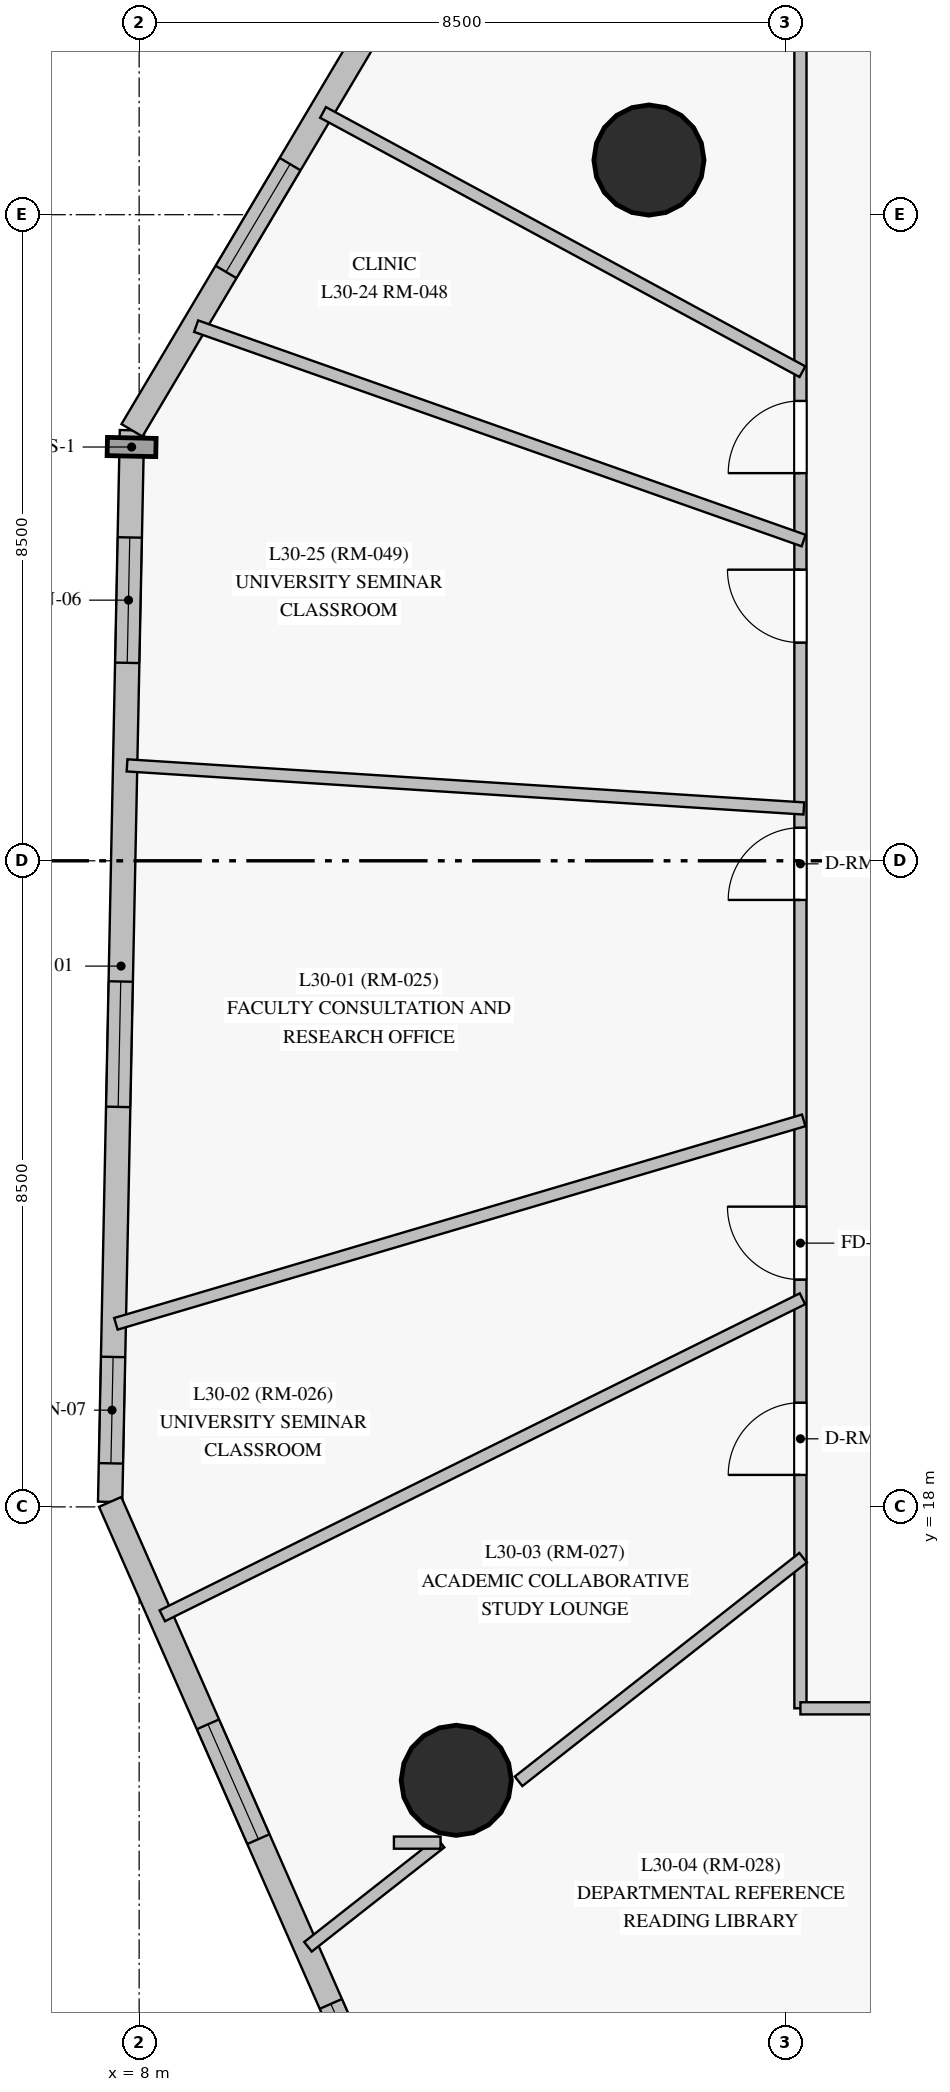
"""IFC4 building model, lengths in metres.
Left out: names, types, materials, properties, quantities, classifications, styles, units other than length and angle.
Written with IfcOpenShell. Run it as: python <this file> out.ifc"""

import sys

from ifc_helpers import new_model, si_unit, direction, frame, frame_2d, origin, origin_with_axes, origin_2d, place, context, subcontext, project, spatial, rectangle, circle, extrude, source, transform, mapped, element, fill, save


model = new_model("IFC4")
c1 = context("Model", 3, precision=1e-05, world=origin(), true_north=direction((0.0, 1.0)))
c2 = subcontext(c1, "Body", "Model", "MODEL_VIEW")
j1 = project(units=[si_unit("LENGTHUNIT", "METRE"), si_unit("PLANEANGLEUNIT", "RADIAN")], contexts=[c1])
p1 = place(None, origin())
s1 = spatial("IfcSite", under=j1, at=p1, CompositionType="ELEMENT")
p2 = place(p1, origin())
s2 = spatial("IfcBuilding", under=s1, at=p2, CompositionType="ELEMENT")
p3 = place(p2, frame((0.0, 0.0, 111.45)))
s3 = spatial("IfcBuildingStorey", under=s2, at=p3, CompositionType="ELEMENT", Elevation=111.45)
m1 = source(origin_with_axes(), c2, "Body", "SweptSolid", [
    extrude(circle(Radius=0.725, at=origin_2d()), origin(), (0.0, 0.0, 1.0), 3.05),
])
for number, where, z_axis, x_axis in (
    (1, (14.707, 35.719, 0.0), (0.0, 0.0, 1.0), (1.0, 0.0, 0.0)),
    (2, (12.172, 14.403, 0.0), (0.0, 0.0, 1.0), (1.0, 0.0, 0.0)),
):
    element("IfcColumn", number, at=place(p3, frame(where, z_axis=z_axis, x_axis=x_axis)), inside=s3, PredefinedType="COLUMN", context=c2, shape_type="MappedRepresentation", body=[
        mapped(m1, transform((0.0, 0.0, 0.0), scale=1.0)),
    ])
p4 = place(p3, frame((7.906, 32.164, 0.0), z_axis=(0.0, 0.0, 1.0), x_axis=(-0.020343518734, -0.999793049208, 0.0)))
e3 = element("IfcWall", 3, at=p4, inside=s3, PredefinedType="SOLIDWALL", context=c2, shape_type="SweptSolid", body=[
    extrude(rectangle(XDim=14.101, YDim=0.32, at=frame_2d((7.051, 0.0))), origin(), (0.0, 0.0, 1.0), 2.825),
])
p5 = place(p4, frame((1.41, 0.0, 0.85)))
e4 = element("IfcOpeningElement", 4, at=p5, cuts=e3, PredefinedType="OPENING", context=c2, shape_type="SweptSolid", body=[
    extrude(rectangle(XDim=1.65, YDim=1.65, at=frame_2d((0.825, 0.825))), frame((0.0, 0.17, 0.0), z_axis=(0.0, -1.0, 0.0), x_axis=(1.0, 0.0, 0.0)), (0.0, 0.0, 1.0), 0.34),
])
p6 = place(p4, frame((7.253, 0.0, 0.85)))
e5 = element("IfcOpeningElement", 5, at=p6, cuts=e3, PredefinedType="OPENING", context=c2, shape_type="SweptSolid", body=[
    extrude(rectangle(XDim=1.65, YDim=1.65, at=frame_2d((0.825, 0.825))), frame((0.0, 0.17, 0.0), z_axis=(0.0, -1.0, 0.0), x_axis=(1.0, 0.0, 0.0)), (0.0, 0.0, 1.0), 0.34),
])
p7 = place(p4, frame((12.194, 0.0, 0.85)))
e6 = element("IfcOpeningElement", 6, at=p7, cuts=e3, PredefinedType="OPENING", context=c2, shape_type="SweptSolid", body=[
    extrude(rectangle(XDim=1.4, YDim=1.65, at=frame_2d((0.7, 0.825))), frame((0.0, 0.17, 0.0), z_axis=(0.0, -1.0, 0.0), x_axis=(1.0, 0.0, 0.0)), (0.0, 0.0, 1.0), 0.34),
])
p8 = place(p3, frame((7.619, 18.066, 0.0), z_axis=(0.0, 0.0, 1.0), x_axis=(0.402458923795, -0.915438045232, 0.0)))
e7 = element("IfcWall", 7, at=p8, inside=s3, PredefinedType="SOLIDWALL", context=c2, shape_type="SweptSolid", body=[
    extrude(rectangle(XDim=9.742, YDim=0.32, at=frame_2d((4.871, 0.0))), origin(), (0.0, 0.0, 1.0), 2.825),
])
p9 = place(p8, frame((3.197, 0.0, 0.85)))
e8 = element("IfcOpeningElement", 8, at=p9, cuts=e7, PredefinedType="OPENING", context=c2, shape_type="SweptSolid", body=[
    extrude(rectangle(XDim=1.65, YDim=1.65, at=frame_2d((0.825, 0.825))), frame((0.0, 0.17, 0.0), z_axis=(0.0, -1.0, 0.0), x_axis=(1.0, 0.0, 0.0)), (0.0, 0.0, 1.0), 0.34),
])
p10 = place(p8, frame((7.214, 0.0, 0.85)))
e9 = element("IfcOpeningElement", 9, at=p10, cuts=e7, PredefinedType="OPENING", context=c2, shape_type="SweptSolid", body=[
    extrude(rectangle(XDim=1.65, YDim=1.65, at=frame_2d((0.825, 0.825))), frame((0.0, 0.17, 0.0), z_axis=(0.0, -1.0, 0.0), x_axis=(1.0, 0.0, 0.0)), (0.0, 0.0, 1.0), 0.34),
])
p11 = place(p3, frame((13.68, 41.881, 0.0), z_axis=(0.0, 0.0, 1.0), x_axis=(-0.510835150925, -0.859678689151, 0.0)))
e10 = element("IfcWall", 10, at=p11, inside=s3, PredefinedType="SOLIDWALL", context=c2, shape_type="SweptSolid", body=[
    extrude(rectangle(XDim=11.303, YDim=0.32, at=frame_2d((5.652, 0.0))), origin(), (0.0, 0.0, 1.0), 2.825),
])
p12 = place(p11, frame((2.417, 0.0, 0.85)))
e11 = element("IfcOpeningElement", 11, at=p12, cuts=e10, PredefinedType="OPENING", context=c2, shape_type="SweptSolid", body=[
    extrude(rectangle(XDim=1.65, YDim=1.65, at=frame_2d((0.825, 0.825))), frame((0.0, 0.17, 0.0), z_axis=(0.0, -1.0, 0.0), x_axis=(1.0, 0.0, 0.0)), (0.0, 0.0, 1.0), 0.34),
])
p13 = place(p11, frame((7.23, 0.0, 0.85)))
e12 = element("IfcOpeningElement", 12, at=p13, cuts=e10, PredefinedType="OPENING", context=c2, shape_type="SweptSolid", body=[
    extrude(rectangle(XDim=1.65, YDim=1.65, at=frame_2d((0.825, 0.825))), frame((0.0, 0.17, 0.0), z_axis=(0.0, -1.0, 0.0), x_axis=(1.0, 0.0, 0.0)), (0.0, 0.0, 1.0), 0.34),
])
p14 = place(p3, frame((16.7, 15.35, 0.0), z_axis=(0.0, 0.0, 1.0), x_axis=(0.0, 1.0, 0.0)))
e13 = element("IfcWall", 13, at=p14, inside=s3, PredefinedType="PARTITIONING", context=c2, shape_type="SweptSolid", body=[
    extrude(rectangle(XDim=22.3, YDim=0.16, at=frame_2d((11.15, 0.0))), origin(), (0.0, 0.0, 1.0), 2.225),
])
p15 = place(p14, frame((10.635, 0.0, 0.0)))
e14 = element("IfcOpeningElement", 14, at=p15, cuts=e13, PredefinedType="OPENING", context=c2, shape_type="SweptSolid", body=[
    extrude(rectangle(XDim=0.95, YDim=2.15, at=frame_2d((0.475, 1.075))), frame((0.0, 0.09, 0.0), z_axis=(0.0, -1.0, 0.0), x_axis=(1.0, 0.0, 0.0)), (0.0, 0.0, 1.0), 0.18),
])
p16 = place(p14, frame((5.64, 0.0, 0.0)))
e15 = element("IfcOpeningElement", 15, at=p16, cuts=e13, PredefinedType="OPENING", context=c2, shape_type="SweptSolid", body=[
    extrude(rectangle(XDim=0.96, YDim=2.15, at=frame_2d((0.48, 1.075))), frame((0.0, 0.09, 0.0), z_axis=(0.0, -1.0, 0.0), x_axis=(1.0, 0.0, 0.0)), (0.0, 0.0, 1.0), 0.18),
])
p17 = place(p14, frame((3.071, 0.0, 0.0)))
e16 = element("IfcOpeningElement", 16, at=p17, cuts=e13, PredefinedType="OPENING", context=c2, shape_type="SweptSolid", body=[
    extrude(rectangle(XDim=0.95, YDim=2.15, at=frame_2d((0.475, 1.075))), frame((0.0, 0.09, 0.0), z_axis=(0.0, -1.0, 0.0), x_axis=(1.0, 0.0, 0.0)), (0.0, 0.0, 1.0), 0.18),
])
p18 = place(p14, frame((16.25, 0.0, 0.0)))
e17 = element("IfcOpeningElement", 17, at=p18, cuts=e13, PredefinedType="OPENING", context=c2, shape_type="SweptSolid", body=[
    extrude(rectangle(XDim=0.95, YDim=2.15, at=frame_2d((0.475, 1.075))), frame((0.0, 0.09, 0.0), z_axis=(0.0, -1.0, 0.0), x_axis=(1.0, 0.0, 0.0)), (0.0, 0.0, 1.0), 0.18),
])
p19 = place(p14, frame((14.02, 0.0, 0.0)))
e18 = element("IfcOpeningElement", 18, at=p19, cuts=e13, PredefinedType="OPENING", context=c2, shape_type="SweptSolid", body=[
    extrude(rectangle(XDim=0.96, YDim=2.15, at=frame_2d((0.48, 1.075))), frame((0.0, 0.09, 0.0), z_axis=(0.0, -1.0, 0.0), x_axis=(1.0, 0.0, 0.0)), (0.0, 0.0, 1.0), 0.18),
])
p20 = place(p3, frame((22.667, 15.377, 0.0), z_axis=(0.0, 0.0, 1.0), x_axis=(-0.460195420674, -0.887817647262, 0.0)))
e19 = element("IfcWall", 19, at=p20, inside=s3, PredefinedType="PARTITIONING", context=c2, shape_type="SweptSolid", body=[
    extrude(rectangle(XDim=11.708, YDim=0.16, at=frame_2d((5.854, 0.0))), origin(), (0.0, 0.0, 1.0), 2.825),
])
p21 = place(p20, frame((5.424, 0.0, 0.0)))
e20 = element("IfcOpeningElement", 20, at=p21, cuts=e19, PredefinedType="OPENING", context=c2, shape_type="SweptSolid", body=[
    extrude(rectangle(XDim=0.86, YDim=2.04, at=frame_2d((0.43, 1.02))), frame((0.0, 0.09, 0.0), z_axis=(0.0, -1.0, 0.0), x_axis=(1.0, 0.0, 0.0)), (0.0, 0.0, 1.0), 0.18),
])
p22 = place(p3, frame((27.55, 15.35, 0.0), z_axis=(0.0, 0.0, 1.0), x_axis=(-1.0, 0.0, 0.0)))
e21 = element("IfcWall", 21, at=p22, inside=s3, PredefinedType="PARTITIONING", context=c2, shape_type="SweptSolid", body=[
    extrude(rectangle(XDim=10.85, YDim=0.16, at=frame_2d((5.425, 0.0))), origin(), (0.0, 0.0, 1.0), 2.325),
])
p23 = place(p22, frame((7.167, 0.0, 0.0)))
e22 = element("IfcOpeningElement", 22, at=p23, cuts=e21, PredefinedType="OPENING", context=c2, shape_type="SweptSolid", body=[
    extrude(rectangle(XDim=0.95, YDim=2.15, at=frame_2d((0.475, 1.075))), frame((0.0, 0.09, 0.0), z_axis=(0.0, -1.0, 0.0), x_axis=(1.0, 0.0, 0.0)), (0.0, 0.0, 1.0), 0.18),
])
p24 = place(p22, frame((3.71, 0.0, 0.0)))
e23 = element("IfcOpeningElement", 23, at=p24, cuts=e21, PredefinedType="OPENING", context=c2, shape_type="SweptSolid", body=[
    extrude(rectangle(XDim=0.95, YDim=2.15, at=frame_2d((0.475, 1.075))), frame((0.0, 0.09, 0.0), z_axis=(0.0, -1.0, 0.0), x_axis=(1.0, 0.0, 0.0)), (0.0, 0.0, 1.0), 0.18),
])
p25 = place(p22, frame((1.583, 0.0, 0.0)))
e24 = element("IfcOpeningElement", 24, at=p25, cuts=e21, PredefinedType="OPENING", context=c2, shape_type="SweptSolid", body=[
    extrude(rectangle(XDim=0.95, YDim=2.15, at=frame_2d((0.475, 1.075))), frame((0.0, 0.09, 0.0), z_axis=(0.0, -1.0, 0.0), x_axis=(1.0, 0.0, 0.0)), (0.0, 0.0, 1.0), 0.18),
])
p26 = place(p22, frame((8.303, 0.0, 0.0)))
e25 = element("IfcOpeningElement", 25, at=p26, cuts=e21, PredefinedType="OPENING", context=c2, shape_type="SweptSolid", body=[
    extrude(rectangle(XDim=0.96, YDim=2.15, at=frame_2d((0.48, 1.075))), frame((0.0, 0.09, 0.0), z_axis=(0.0, -1.0, 0.0), x_axis=(1.0, 0.0, 0.0)), (0.0, 0.0, 1.0), 0.18),
])
p27 = place(p3, frame((16.743, 23.085, 0.0), z_axis=(0.0, 0.0, 1.0), x_axis=(-0.958924344343, -0.283661949908, 0.0)))
e26 = element("IfcWall", 26, at=p27, inside=s3, PredefinedType="PARTITIONING", context=c2, shape_type="SweptSolid", body=[
    extrude(rectangle(XDim=9.437, YDim=0.16, at=frame_2d((4.718, 0.0))), origin(), (0.0, 0.0, 1.0), 2.825),
])
p28 = place(p3, frame((16.727, 20.738, 0.0), z_axis=(0.0, 0.0, 1.0), x_axis=(-0.89615060854, -0.443750027396, 0.0)))
e27 = element("IfcWall", 27, at=p28, inside=s3, PredefinedType="PARTITIONING", context=c2, shape_type="SweptSolid", body=[
    extrude(rectangle(XDim=9.398, YDim=0.16, at=frame_2d((4.699, 0.0))), origin(), (0.0, 0.0, 1.0), 2.825),
])
p29 = place(p3, frame((7.841, 27.755, 0.0), z_axis=(0.0, 0.0, 1.0), x_axis=(0.997979506353, -0.063536642184, 0.0)))
e28 = element("IfcWall", 28, at=p29, inside=s3, PredefinedType="PARTITIONING", context=c2, shape_type="SweptSolid", body=[
    extrude(rectangle(XDim=8.922, YDim=0.16, at=frame_2d((4.461, 0.0))), origin(), (0.0, 0.0, 1.0), 2.825),
])
p30 = place(p3, frame((16.742, 30.713, 0.0), z_axis=(0.0, 0.0, 1.0), x_axis=(-0.942995651182, 0.33280505082, 0.0)))
e29 = element("IfcWall", 29, at=p30, inside=s3, PredefinedType="PARTITIONING", context=c2, shape_type="SweptSolid", body=[
    extrude(rectangle(XDim=8.476, YDim=0.16, at=frame_2d((4.238, 0.0))), origin(), (0.0, 0.0, 1.0), 2.825),
])
p31 = place(p3, frame((21.014, 15.375, 0.0), z_axis=(0.0, 0.0, 1.0), x_axis=(-0.554554514282, -0.832147397214, 0.0)))
e30 = element("IfcWall", 30, at=p31, inside=s3, PredefinedType="PARTITIONING", context=c2, shape_type="SweptSolid", body=[
    extrude(rectangle(XDim=7.735, YDim=0.16, at=frame_2d((3.868, 0.0))), origin(), (0.0, 0.0, 1.0), 2.825),
])
p32 = place(p3, frame((16.726, 32.935, 0.0), z_axis=(0.0, 0.0, 1.0), x_axis=(-0.879632203362, 0.475654482591, 0.0)))
e31 = element("IfcWall", 31, at=p32, inside=s3, PredefinedType="PARTITIONING", context=c2, shape_type="SweptSolid", body=[
    extrude(rectangle(XDim=7.17, YDim=0.16, at=frame_2d((3.585, 0.0))), origin(), (0.0, 0.0, 1.0), 2.825),
])
p33 = place(p3, frame((16.735, 17.331, 0.0), z_axis=(0.0, 0.0, 1.0), x_axis=(-0.786302323137, -0.617841934987, 0.0)))
e32 = element("IfcWall", 32, at=p33, inside=s3, PredefinedType="PARTITIONING", context=c2, shape_type="SweptSolid", body=[
    extrude(rectangle(XDim=4.761, YDim=0.16, at=frame_2d((2.38, 0.0))), origin(), (0.0, 0.0, 1.0), 2.225),
])
p34 = place(p3, frame((11.965, 13.583, 0.0), z_axis=(0.0, 0.0, 1.0), x_axis=(-0.786283960073, -0.617865304198, 0.0)))
e33 = element("IfcWall", 33, at=p34, inside=s3, PredefinedType="PARTITIONING", context=c2, shape_type="SweptSolid", body=[
    extrude(rectangle(XDim=2.218, YDim=0.16, at=frame_2d((1.109, 0.0))), origin(), (0.0, 0.0, 1.0), 2.825),
])
p35 = place(p3, frame((11.352, 13.583, 0.0), z_axis=(0.0, 0.0, 1.0), x_axis=(1.0, 0.0, 0.0)))
e34 = element("IfcWall", 34, at=p35, inside=s3, PredefinedType="PARTITIONING", context=c2, shape_type="SweptSolid", body=[
    extrude(rectangle(XDim=0.613, YDim=0.16, at=frame_2d((0.307, 0.0))), origin(), (0.0, 0.0, 1.0), 2.825),
])
m2 = source(origin_with_axes(), c2, "Body", "SweptSolid", [
    extrude(rectangle(XDim=1.65, YDim=1.65, at=frame_2d((0.825, 0.825))), frame((0.0, 0.03, 0.0), z_axis=(0.0, -1.0, 0.0), x_axis=(1.0, 0.0, 0.0)), (0.0, 0.0, 1.0), 0.06),
])
p36 = place(p5, origin())
e35 = element("IfcWindow", 35, at=p36, inside=s3, PartitioningType="SINGLE_PANEL", PredefinedType="WINDOW", context=c2, shape_type="MappedRepresentation", body=[
    mapped(m2, transform((0.0, 0.0, 0.0), scale=1.0)),
])
fill(e4, e35)
p37 = place(p6, origin())
e36 = element("IfcWindow", 36, at=p37, inside=s3, PartitioningType="SINGLE_PANEL", PredefinedType="WINDOW", context=c2, shape_type="MappedRepresentation", body=[
    mapped(m2, transform((0.0, 0.0, 0.0), scale=1.0)),
])
fill(e5, e36)
m3 = source(origin_with_axes(), c2, "Body", "SweptSolid", [
    extrude(rectangle(XDim=1.4, YDim=1.65, at=frame_2d((0.7, 0.825))), frame((0.0, 0.03, 0.0), z_axis=(0.0, -1.0, 0.0), x_axis=(1.0, 0.0, 0.0)), (0.0, 0.0, 1.0), 0.06),
])
p38 = place(p7, origin())
e37 = element("IfcWindow", 37, at=p38, inside=s3, PartitioningType="SINGLE_PANEL", PredefinedType="WINDOW", context=c2, shape_type="MappedRepresentation", body=[
    mapped(m3, transform((0.0, 0.0, 0.0), scale=1.0)),
])
fill(e6, e37)
p39 = place(p9, origin())
e38 = element("IfcWindow", 38, at=p39, inside=s3, PartitioningType="SINGLE_PANEL", PredefinedType="WINDOW", context=c2, shape_type="MappedRepresentation", body=[
    mapped(m2, transform((0.0, 0.0, 0.0), scale=1.0)),
])
fill(e8, e38)
p40 = place(p10, origin())
e39 = element("IfcWindow", 39, at=p40, inside=s3, PartitioningType="SINGLE_PANEL", PredefinedType="WINDOW", context=c2, shape_type="MappedRepresentation", body=[
    mapped(m2, transform((0.0, 0.0, 0.0), scale=1.0)),
])
fill(e9, e39)
p41 = place(p13, origin())
e40 = element("IfcWindow", 40, at=p41, inside=s3, PartitioningType="SINGLE_PANEL", PredefinedType="WINDOW", context=c2, shape_type="MappedRepresentation", body=[
    mapped(m2, transform((0.0, 0.0, 0.0), scale=1.0)),
])
fill(e12, e40)
m4 = source(origin_with_axes(), c2, "Body", "SweptSolid", [
    extrude(rectangle(XDim=0.95, YDim=2.15, at=frame_2d((0.475, 1.075))), frame((0.0, 0.025, 0.0), z_axis=(0.0, -1.0, 0.0), x_axis=(1.0, 0.0, 0.0)), (0.0, 0.0, 1.0), 0.05),
])
p42 = place(p15, origin())
e41 = element("IfcDoor", 41, at=p42, inside=s3, OperationType="SINGLE_SWING_LEFT", PredefinedType="DOOR", context=c2, shape_type="MappedRepresentation", body=[
    mapped(m4, transform((0.0, 0.0, 0.0), scale=1.0)),
])
fill(e14, e41)
m5 = source(origin_with_axes(), c2, "Body", "SweptSolid", [
    extrude(rectangle(XDim=0.96, YDim=2.15, at=frame_2d((0.48, 1.075))), frame((0.0, 0.025, 0.0), z_axis=(0.0, -1.0, 0.0), x_axis=(1.0, 0.0, 0.0)), (0.0, 0.0, 1.0), 0.05),
])
p43 = place(p16, origin())
e42 = element("IfcDoor", 42, at=p43, inside=s3, OperationType="SINGLE_SWING_RIGHT", PredefinedType="DOOR", context=c2, shape_type="MappedRepresentation", body=[
    mapped(m5, transform((0.0, 0.0, 0.0), scale=1.0)),
])
fill(e15, e42)
p44 = place(p17, origin())
e43 = element("IfcDoor", 43, at=p44, inside=s3, OperationType="SINGLE_SWING_LEFT", PredefinedType="DOOR", context=c2, shape_type="MappedRepresentation", body=[
    mapped(m4, transform((0.0, 0.0, 0.0), scale=1.0)),
])
fill(e16, e43)
p45 = place(p18, origin())
e44 = element("IfcDoor", 44, at=p45, inside=s3, OperationType="SINGLE_SWING_LEFT", PredefinedType="DOOR", context=c2, shape_type="MappedRepresentation", body=[
    mapped(m4, transform((0.0, 0.0, 0.0), scale=1.0)),
])
fill(e17, e44)
p46 = place(p19, origin())
e45 = element("IfcDoor", 45, at=p46, inside=s3, OperationType="SINGLE_SWING_RIGHT", PredefinedType="DOOR", context=c2, shape_type="MappedRepresentation", body=[
    mapped(m5, transform((0.0, 0.0, 0.0), scale=1.0)),
])
fill(e18, e45)
save(model, sys.argv[1])
